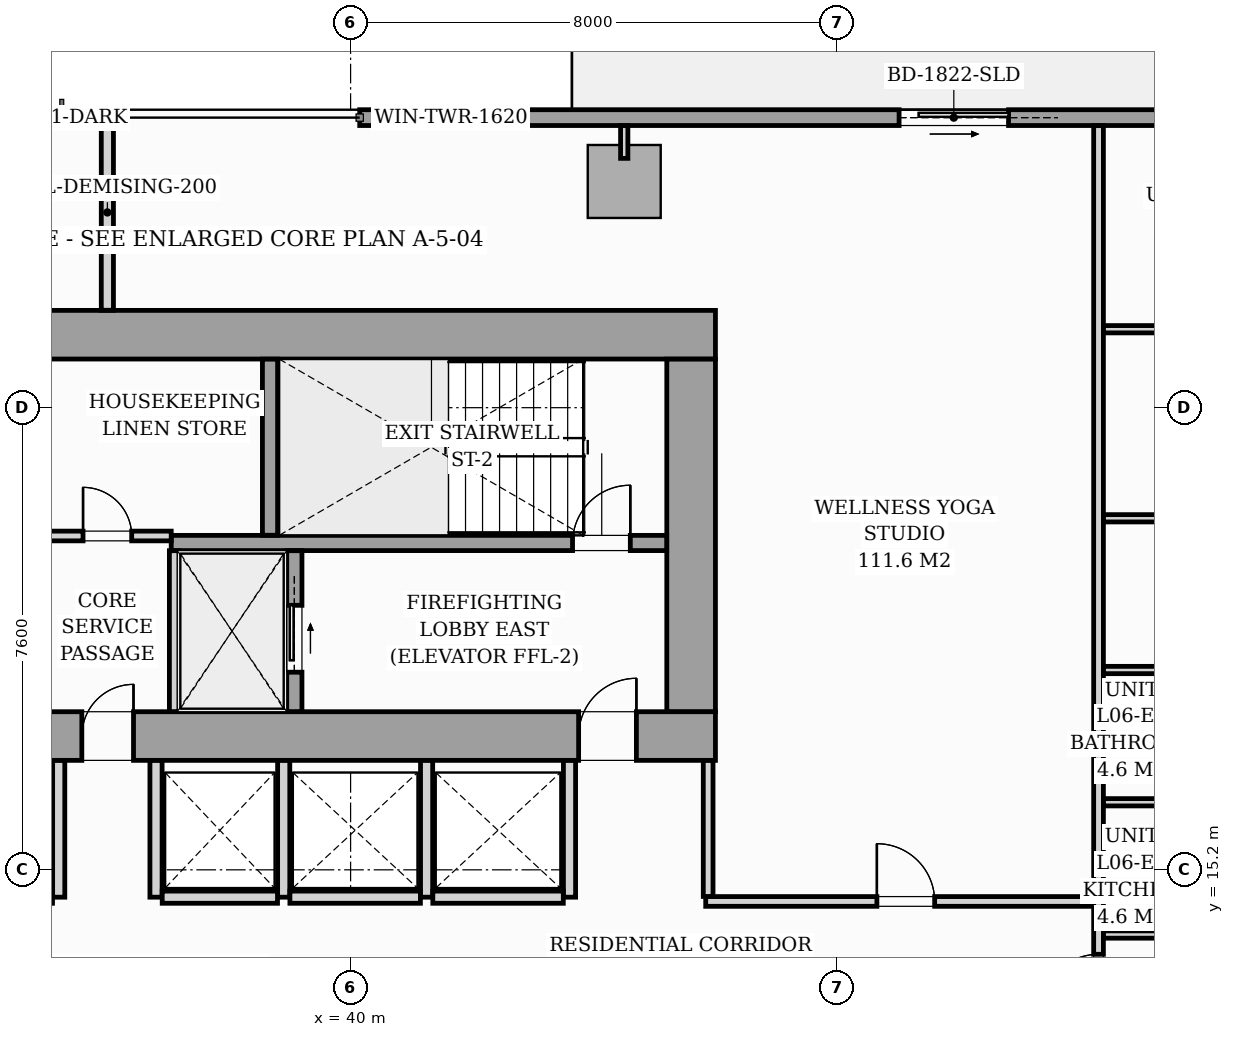
"""IFC4 building model, lengths in metres.
Left out: names, types, materials, properties, quantities, classifications, styles, units other than length and angle.
Written with IfcOpenShell. Run it as: python <this file> out.ifc"""

import sys

from ifc_helpers import new_model, si_unit, direction, frame, frame_2d, origin, origin_2d, place, context, subcontext, project, spatial, rectangle, i_section, extrude, source, transform, mapped, element, fill, save


model = new_model("IFC4")
c1 = context("Model", 3, precision=1e-05, world=origin(), true_north=direction((0.0, 1.0)))
c2 = subcontext(c1, "Body", "Model", "MODEL_VIEW")
j1 = project(units=[si_unit("LENGTHUNIT", "METRE"), si_unit("PLANEANGLEUNIT", "RADIAN")], contexts=[c1])
p1 = place(None, origin())
s1 = spatial("IfcSite", under=j1, at=p1, CompositionType="ELEMENT")
p2 = place(p1, origin())
s2 = spatial("IfcBuilding", under=s1, at=p2, CompositionType="ELEMENT")
p3 = place(p2, frame((0.0, 0.0, 26.2)))
s3 = spatial("IfcBuildingStorey", under=s2, at=p3, CompositionType="ELEMENT", Elevation=26.2)
m1 = source(origin(), c2, "Body", "SweptSolid", [
    extrude(i_section(OverallWidth=0.437, OverallDepth=0.514, WebThickness=0.061, FlangeThickness=0.097, FilletRadius=0.018, at=origin_2d()), origin(), (0.0, 0.0, 1.0), 3.196),
])
for number, where, z_axis, x_axis in (
    (1, (38.88, 17.4, 0.002), (0.0, 0.0, 1.0), (1.0, 0.0, 0.0)),
    (2, (45.6, 17.4, 0.002), (0.0, 0.0, 1.0), (1.0, 0.0, 0.0)),
    (3, (38.88, 24.0, 0.002), (0.0, 0.0, 1.0), (1.0, 0.0, 0.0)),
    (4, (45.6, 24.0, 0.002), (0.0, 0.0, 1.0), (1.0, 0.0, 0.0)),
):
    element("IfcColumn", number, at=place(p3, frame(where, z_axis=z_axis, x_axis=x_axis)), inside=s3, PredefinedType="PILASTER", context=c2, shape_type="MappedRepresentation", body=[
        mapped(m1, transform((0.0, 0.0, 0.0), scale=1.0)),
    ])
m2 = source(origin(), c2, "Body", "SweptSolid", [
    extrude(rectangle(XDim=1.2, YDim=1.2, at=origin_2d()), origin(), (0.0, 0.0, 1.0), 3.196),
])
p4 = place(p3, frame((44.5, 26.52, 0.002), z_axis=(0.0, 0.0, 1.0), x_axis=(1.0, 0.0, 0.0)))
e5 = element("IfcColumn", 5, at=p4, inside=s3, PredefinedType="COLUMN", context=c2, shape_type="MappedRepresentation", body=[
    mapped(m2, transform((0.0, 0.0, 0.0), scale=1.0)),
])
p5 = place(p3, frame((40.15, 27.57, 0.0), z_axis=(0.0, 0.0, 1.0), x_axis=(1.0, 0.0, 0.0)))
e6 = element("IfcWall", 6, at=p5, inside=s3, PredefinedType="STANDARD", context=c2, shape_type="SweptSolid", body=[
    extrude(rectangle(XDim=17.15, YDim=0.26, at=frame_2d((8.575, 0.0))), origin(), (0.0, 0.0, 1.0), 2.94),
])
p6 = place(p5, frame((8.87, 0.0, 0.0)))
e7 = element("IfcOpeningElement", 7, at=p6, cuts=e6, PredefinedType="OPENING", context=c2, shape_type="SweptSolid", body=[
    extrude(rectangle(XDim=1.8, YDim=2.06, at=frame_2d((0.9, 1.03))), frame((0.0, 0.14, 0.0), z_axis=(0.0, -1.0, 0.0), x_axis=(1.0, 0.0, 0.0)), (0.0, 0.0, 1.0), 0.28),
])
p7 = place(p5, frame((0.7, 0.0, 0.65)))
e8 = element("IfcOpeningElement", 8, at=p7, cuts=e6, PredefinedType="OPENING", context=c2, shape_type="SweptSolid", body=[
    extrude(rectangle(XDim=1.6, YDim=1.5, at=frame_2d((0.8, 0.75))), frame((0.0, 0.14, 0.0), z_axis=(0.0, -1.0, 0.0), x_axis=(1.0, 0.0, 0.0)), (0.0, 0.0, 1.0), 0.28),
])
p8 = place(p3, frame((26.0, 17.4, 0.0), z_axis=(0.0, 0.0, 1.0), x_axis=(1.0, 0.0, 0.0)))
e9 = element("IfcWall", 9, at=p8, inside=s3, PredefinedType="SHEAR", context=c2, shape_type="SweptSolid", body=[
    extrude(rectangle(XDim=20.0, YDim=0.8, at=frame_2d((10.0, 0.0))), origin(), (0.0, 0.0, 1.0), 3.2),
])
p9 = place(p8, frame((1.15, 0.0, 0.0)))
e10 = element("IfcOpeningElement", 10, at=p9, cuts=e9, PredefinedType="OPENING", context=c2, shape_type="SweptSolid", body=[
    extrude(rectangle(XDim=0.95, YDim=2.06, at=frame_2d((0.475, 1.03))), frame((0.0, 0.41, 0.0), z_axis=(0.0, -1.0, 0.0), x_axis=(1.0, 0.0, 0.0)), (0.0, 0.0, 1.0), 0.82),
])
p10 = place(p8, frame((9.58, 0.0, 0.0)))
e11 = element("IfcOpeningElement", 11, at=p10, cuts=e9, PredefinedType="OPENING", context=c2, shape_type="SweptSolid", body=[
    extrude(rectangle(XDim=0.85, YDim=2.0, at=frame_2d((0.425, 1.0))), frame((0.0, 0.41, 0.0), z_axis=(0.0, -1.0, 0.0), x_axis=(1.0, 0.0, 0.0)), (0.0, 0.0, 1.0), 0.82),
])
p11 = place(p8, frame((17.75, 0.0, 0.0)))
e12 = element("IfcOpeningElement", 12, at=p11, cuts=e9, PredefinedType="OPENING", context=c2, shape_type="SweptSolid", body=[
    extrude(rectangle(XDim=0.95, YDim=2.06, at=frame_2d((0.475, 1.03))), frame((0.0, 0.41, 0.0), z_axis=(0.0, -1.0, 0.0), x_axis=(1.0, 0.0, 0.0)), (0.0, 0.0, 1.0), 0.82),
])
p12 = place(p3, frame((26.0, 24.0, 0.0), z_axis=(0.0, 0.0, 1.0), x_axis=(1.0, 0.0, 0.0)))
e13 = element("IfcWall", 13, at=p12, inside=s3, PredefinedType="SHEAR", context=c2, shape_type="SweptSolid", body=[
    extrude(rectangle(XDim=20.0, YDim=0.8, at=frame_2d((10.0, 0.0))), origin(), (0.0, 0.0, 1.0), 3.2),
])
p13 = place(p3, frame((45.6, 17.802, 0.0), z_axis=(0.0, 0.0, 1.0), x_axis=(0.0, 1.0, 0.0)))
e14 = element("IfcWall", 14, at=p13, inside=s3, PredefinedType="SHEAR", context=c2, shape_type="SweptSolid", body=[
    extrude(rectangle(XDim=5.796, YDim=0.8, at=frame_2d((2.898, 0.0))), origin(), (0.0, 0.0, 1.0), 3.2),
])
p14 = place(p3, frame((37.05, 20.575, 0.0), z_axis=(0.0, 0.0, 1.0), x_axis=(1.0, 0.0, 0.0)))
e15 = element("IfcWall", 15, at=p14, inside=s3, PredefinedType="SOLIDWALL", context=c2, shape_type="SweptSolid", body=[
    extrude(rectangle(XDim=8.148, YDim=0.25, at=frame_2d((4.074, 0.0))), origin(), (0.0, 0.0, 1.0), 3.2),
])
p15 = place(p14, frame((6.6, 0.0, 0.0)))
e16 = element("IfcOpeningElement", 16, at=p15, cuts=e15, PredefinedType="OPENING", context=c2, shape_type="SweptSolid", body=[
    extrude(rectangle(XDim=0.95, YDim=2.06, at=frame_2d((0.475, 1.03))), frame((0.0, 0.135, 0.0), z_axis=(0.0, -1.0, 0.0), x_axis=(1.0, 0.0, 0.0)), (0.0, 0.0, 1.0), 0.27),
])
p16 = place(p3, frame((38.675, 20.702, 0.0), z_axis=(0.0, 0.0, 1.0), x_axis=(0.0, 1.0, 0.0)))
e17 = element("IfcWall", 17, at=p16, inside=s3, PredefinedType="SOLIDWALL", context=c2, shape_type="SweptSolid", body=[
    extrude(rectangle(XDim=2.896, YDim=0.25, at=frame_2d((1.448, 0.0))), origin(), (0.0, 0.0, 1.0), 3.2),
])
p17 = place(p3, frame((37.1, 17.802, 0.0), z_axis=(0.0, 0.0, 1.0), x_axis=(0.0, 1.0, 0.0)))
e18 = element("IfcWall", 18, at=p17, inside=s3, PredefinedType="PARTITIONING", context=c2, shape_type="SweptSolid", body=[
    extrude(rectangle(XDim=2.646, YDim=0.16, at=frame_2d((1.323, 0.0))), origin(), (0.0, 0.0, 1.0), 2.94),
])
p18 = place(p3, frame((39.075, 17.802, 0.0), z_axis=(0.0, 0.0, 1.0), x_axis=(0.0, 1.0, 0.0)))
e19 = element("IfcWall", 19, at=p18, inside=s3, PredefinedType="SOLIDWALL", context=c2, shape_type="SweptSolid", body=[
    extrude(rectangle(XDim=2.646, YDim=0.25, at=frame_2d((1.323, 0.0))), origin(), (0.0, 0.0, 1.0), 3.2),
])
p19 = place(p18, frame((0.648, 0.0, 0.0)))
e20 = element("IfcOpeningElement", 20, at=p19, cuts=e19, PredefinedType="OPENING", context=c2, shape_type="SweptSolid", body=[
    extrude(rectangle(XDim=1.1, YDim=2.08, at=frame_2d((0.55, 1.04))), frame((0.0, 0.135, 0.0), z_axis=(0.0, -1.0, 0.0), x_axis=(1.0, 0.0, 0.0)), (0.0, 0.0, 1.0), 0.27),
])
p20 = place(p3, frame((34.95, 20.69, 0.0), z_axis=(0.0, 0.0, 1.0), x_axis=(1.0, 0.0, 0.0)))
e21 = element("IfcWall", 21, at=p20, inside=s3, PredefinedType="PARTITIONING", context=c2, shape_type="SweptSolid", body=[
    extrude(rectangle(XDim=2.1, YDim=0.16, at=frame_2d((1.05, 0.0))), origin(), (0.0, 0.0, 1.0), 2.94),
])
p21 = place(p20, frame((0.65, 0.0, 0.0)))
e22 = element("IfcOpeningElement", 22, at=p21, cuts=e21, PredefinedType="OPENING", context=c2, shape_type="SweptSolid", body=[
    extrude(rectangle(XDim=0.8, YDim=2.05, at=frame_2d((0.4, 1.025))), frame((0.0, 0.09, 0.0), z_axis=(0.0, -1.0, 0.0), x_axis=(1.0, 0.0, 0.0)), (0.0, 0.0, 1.0), 0.18),
])
for number, where, z_axis, x_axis in (
    (23, (35.2, 14.75, 0.0), (0.0, 0.0, 1.0), (0.0, 1.0, 0.0)),
    (24, (36.8, 14.75, 0.0), (0.0, 0.0, 1.0), (0.0, 1.0, 0.0)),
    (25, (38.9, 14.75, 0.0), (0.0, 0.0, 1.0), (0.0, 1.0, 0.0)),
):
    element("IfcWall", number, at=place(p3, frame(where, z_axis=z_axis, x_axis=x_axis)), inside=s3, PredefinedType="PARTITIONING", context=c2, shape_type="SweptSolid", body=[
        extrude(rectangle(XDim=2.248, YDim=0.2, at=frame_2d((1.124, 0.0))), origin(), (0.0, 0.0, 1.0), 2.94),
    ])
p22 = place(p3, frame((36.902, 14.75, 0.0), z_axis=(0.0, 0.0, 1.0), x_axis=(1.0, 0.0, 0.0)))
e26 = element("IfcWall", 26, at=p22, inside=s3, PredefinedType="PARTITIONING", context=c2, shape_type="SweptSolid", body=[
    extrude(rectangle(XDim=1.896, YDim=0.2, at=frame_2d((0.948, 0.0))), origin(), (0.0, 0.0, 1.0), 2.94),
])
for number, where, z_axis, x_axis in (
    (27, (41.25, 14.75, 0.0), (0.0, 0.0, 1.0), (0.0, 1.0, 0.0)),
    (28, (43.6, 14.75, 0.0), (0.0, 0.0, 1.0), (0.0, 1.0, 0.0)),
):
    element("IfcWall", number, at=place(p3, frame(where, z_axis=z_axis, x_axis=x_axis)), inside=s3, PredefinedType="PARTITIONING", context=c2, shape_type="SweptSolid", body=[
        extrude(rectangle(XDim=2.248, YDim=0.2, at=frame_2d((1.124, 0.0))), origin(), (0.0, 0.0, 1.0), 2.94),
    ])
for number, where, z_axis, x_axis in (
    (29, (39.002, 14.75, 0.0), (0.0, 0.0, 1.0), (1.0, 0.0, 0.0)),
    (30, (41.352, 14.75, 0.0), (0.0, 0.0, 1.0), (1.0, 0.0, 0.0)),
):
    element("IfcWall", number, at=place(p3, frame(where, z_axis=z_axis, x_axis=x_axis)), inside=s3, PredefinedType="PARTITIONING", context=c2, shape_type="SweptSolid", body=[
        extrude(rectangle(XDim=2.146, YDim=0.2, at=frame_2d((1.073, 0.0))), origin(), (0.0, 0.0, 1.0), 2.94),
    ])
p23 = place(p3, frame((52.3, 12.432, 0.0), z_axis=(0.0, 0.0, 1.0), x_axis=(0.0, 1.0, 0.0)))
e31 = element("IfcWall", 31, at=p23, inside=s3, PredefinedType="PARTITIONING", context=c2, shape_type="SweptSolid", body=[
    extrude(rectangle(XDim=15.006, YDim=0.16, at=frame_2d((7.503, 0.0))), origin(), (0.0, 0.0, 1.0), 2.94),
])
p24 = place(p23, frame((0.429, 0.0, 0.0)))
e32 = element("IfcOpeningElement", 32, at=p24, cuts=e31, PredefinedType="OPENING", context=c2, shape_type="SweptSolid", body=[
    extrude(rectangle(XDim=0.95, YDim=2.06, at=frame_2d((0.475, 1.03))), frame((0.0, 0.09, 0.0), z_axis=(0.0, -1.0, 0.0), x_axis=(1.0, 0.0, 0.0)), (0.0, 0.0, 1.0), 0.18),
])
p25 = place(p3, frame((36.0, 24.402, 0.0), z_axis=(0.0, 0.0, 1.0), x_axis=(0.0, 1.0, 0.0)))
e33 = element("IfcWall", 33, at=p25, inside=s3, PredefinedType="PARTITIONING", context=c2, shape_type="SweptSolid", body=[
    extrude(rectangle(XDim=3.218, YDim=0.2, at=frame_2d((1.609, 0.0))), origin(), (0.0, 0.0, 1.0), 2.94),
])
p26 = place(p3, frame((52.382, 16.311, 0.0), z_axis=(0.0, 0.0, 1.0), x_axis=(1.0, 0.0, 0.0)))
e34 = element("IfcWall", 34, at=p26, inside=s3, PredefinedType="PARTITIONING", context=c2, shape_type="SweptSolid", body=[
    extrude(rectangle(XDim=2.256, YDim=0.12, at=frame_2d((1.128, 0.0))), origin(), (0.0, 0.0, 1.0), 2.045),
])
for number, where, z_axis, x_axis in (
    (35, (52.382, 14.136, 0.0), (0.0, 0.0, 1.0), (1.0, 0.0, 0.0)),
    (36, (52.382, 18.486, 0.0), (0.0, 0.0, 1.0), (1.0, 0.0, 0.0)),
):
    element("IfcWall", number, at=place(p3, frame(where, z_axis=z_axis, x_axis=x_axis)), inside=s3, PredefinedType="PARTITIONING", context=c2, shape_type="SweptSolid", body=[
        extrude(rectangle(XDim=2.256, YDim=0.12, at=frame_2d((1.128, 0.0))), origin(), (0.0, 0.0, 1.0), 2.94),
    ])
p27 = place(p3, frame((52.382, 24.09, 0.0), z_axis=(0.0, 0.0, 1.0), x_axis=(1.0, 0.0, 0.0)))
e37 = element("IfcWall", 37, at=p27, inside=s3, PredefinedType="PARTITIONING", context=c2, shape_type="SweptSolid", body=[
    extrude(rectangle(XDim=7.338, YDim=0.12, at=frame_2d((3.669, 0.0))), origin(), (0.0, 0.0, 1.0), 2.94),
])
p28 = place(p27, frame((3.253, 0.0, 0.0)))
e38 = element("IfcOpeningElement", 38, at=p28, cuts=e37, PredefinedType="OPENING", context=c2, shape_type="SweptSolid", body=[
    extrude(rectangle(XDim=0.85, YDim=2.05, at=frame_2d((0.425, 1.025))), frame((0.0, 0.07, 0.0), z_axis=(0.0, -1.0, 0.0), x_axis=(1.0, 0.0, 0.0)), (0.0, 0.0, 1.0), 0.14),
])
p29 = place(p3, frame((52.382, 20.981, 0.0), z_axis=(0.0, 0.0, 1.0), x_axis=(1.0, 0.0, 0.0)))
e39 = element("IfcWall", 39, at=p29, inside=s3, PredefinedType="PARTITIONING", context=c2, shape_type="SweptSolid", body=[
    extrude(rectangle(XDim=7.338, YDim=0.12, at=frame_2d((3.669, 0.0))), origin(), (0.0, 0.0, 1.0), 2.94),
])
p30 = place(p29, frame((3.253, 0.0, 0.0)))
e40 = element("IfcOpeningElement", 40, at=p30, cuts=e39, PredefinedType="OPENING", context=c2, shape_type="SweptSolid", body=[
    extrude(rectangle(XDim=0.85, YDim=2.05, at=frame_2d((0.425, 1.025))), frame((0.0, 0.07, 0.0), z_axis=(0.0, -1.0, 0.0), x_axis=(1.0, 0.0, 0.0)), (0.0, 0.0, 1.0), 0.14),
])
p31 = place(p3, frame((45.84, 14.68, 0.0), z_axis=(0.0, 0.0, 1.0), x_axis=(1.0, 0.0, 0.0)))
e41 = element("IfcWall", 41, at=p31, inside=s3, PredefinedType="PARTITIONING", context=c2, shape_type="SweptSolid", body=[
    extrude(rectangle(XDim=6.378, YDim=0.16, at=frame_2d((3.189, 0.0))), origin(), (0.0, 0.0, 1.0), 2.94),
])
p32 = place(p31, frame((2.815, 0.0, 0.0)))
e42 = element("IfcOpeningElement", 42, at=p32, cuts=e41, PredefinedType="OPENING", context=c2, shape_type="SweptSolid", body=[
    extrude(rectangle(XDim=0.95, YDim=2.06, at=frame_2d((0.475, 1.03))), frame((0.0, 0.09, 0.0), z_axis=(0.0, -1.0, 0.0), x_axis=(1.0, 0.0, 0.0)), (0.0, 0.0, 1.0), 0.18),
])
p33 = place(p3, frame((45.88, 14.762, 0.0), z_axis=(0.0, 0.0, 1.0), x_axis=(0.0, 1.0, 0.0)))
e43 = element("IfcWall", 43, at=p33, inside=s3, PredefinedType="PARTITIONING", context=c2, shape_type="SweptSolid", body=[
    extrude(rectangle(XDim=2.236, YDim=0.16, at=frame_2d((1.118, 0.0))), origin(), (0.0, 0.0, 1.0), 2.94),
])
p34 = place(p3, frame((44.5, 26.9, 0.0), z_axis=(0.0, 0.0, 1.0), x_axis=(0.0, 1.0, 0.0)))
e44 = element("IfcWall", 44, at=p34, inside=s3, PredefinedType="PARTITIONING", context=c2, shape_type="SweptSolid", body=[
    extrude(rectangle(XDim=0.538, YDim=0.12, at=frame_2d((0.269, 0.0))), origin(), (0.0, 0.0, 1.0), 2.94),
])
m3 = source(origin(), c2, "Body", "SweptSolid", [
    extrude(rectangle(XDim=1.8, YDim=2.06, at=frame_2d((0.9, 1.03))), frame((0.0, 0.025, 0.0), z_axis=(0.0, -1.0, 0.0), x_axis=(1.0, 0.0, 0.0)), (0.0, 0.0, 1.0), 0.05),
])
p35 = place(p6, origin())
e45 = element("IfcDoor", 45, at=p35, inside=s3, OperationType="SLIDING_TO_RIGHT", PredefinedType="DOOR", context=c2, shape_type="MappedRepresentation", body=[
    mapped(m3, transform((0.0, 0.0, 0.0), scale=1.0)),
])
fill(e7, e45)
m4 = source(origin(), c2, "Body", "SweptSolid", [
    extrude(rectangle(XDim=1.6, YDim=1.5, at=frame_2d((0.8, 0.75))), frame((0.0, 0.03, 0.0), z_axis=(0.0, -1.0, 0.0), x_axis=(1.0, 0.0, 0.0)), (0.0, 0.0, 1.0), 0.06),
])
p36 = place(p7, origin())
e46 = element("IfcWindow", 46, at=p36, inside=s3, PartitioningType="SINGLE_PANEL", PredefinedType="WINDOW", context=c2, shape_type="MappedRepresentation", body=[
    mapped(m4, transform((0.0, 0.0, 0.0), scale=1.0)),
])
fill(e8, e46)
m5 = source(origin(), c2, "Body", "SweptSolid", [
    extrude(rectangle(XDim=0.85, YDim=2.0, at=frame_2d((0.425, 1.0))), frame((0.0, 0.025, 0.0), z_axis=(0.0, -1.0, 0.0), x_axis=(1.0, 0.0, 0.0)), (0.0, 0.0, 1.0), 0.05),
])
p37 = place(p10, origin())
e47 = element("IfcDoor", 47, at=p37, inside=s3, OperationType="SINGLE_SWING_RIGHT", PredefinedType="DOOR", context=c2, shape_type="MappedRepresentation", body=[
    mapped(m5, transform((0.0, 0.0, 0.0), scale=1.0)),
])
fill(e11, e47)
m6 = source(origin(), c2, "Body", "SweptSolid", [
    extrude(rectangle(XDim=0.95, YDim=2.06, at=frame_2d((0.475, 1.03))), frame((0.0, 0.025, 0.0), z_axis=(0.0, -1.0, 0.0), x_axis=(1.0, 0.0, 0.0)), (0.0, 0.0, 1.0), 0.05),
])
p38 = place(p11, origin())
e48 = element("IfcDoor", 48, at=p38, inside=s3, OperationType="SINGLE_SWING_RIGHT", PredefinedType="DOOR", context=c2, shape_type="MappedRepresentation", body=[
    mapped(m6, transform((0.0, 0.0, 0.0), scale=1.0)),
])
fill(e12, e48)
p39 = place(p15, origin())
e49 = element("IfcDoor", 49, at=p39, inside=s3, OperationType="SINGLE_SWING_RIGHT", PredefinedType="DOOR", context=c2, shape_type="MappedRepresentation", body=[
    mapped(m6, transform((0.0, 0.0, 0.0), scale=1.0)),
])
fill(e16, e49)
m7 = source(origin(), c2, "Body", "SweptSolid", [
    extrude(rectangle(XDim=1.1, YDim=2.08, at=frame_2d((0.55, 1.04))), frame((0.0, 0.025, 0.0), z_axis=(0.0, -1.0, 0.0), x_axis=(1.0, 0.0, 0.0)), (0.0, 0.0, 1.0), 0.05),
])
p40 = place(p19, origin())
e50 = element("IfcDoor", 50, at=p40, inside=s3, OperationType="SLIDING_TO_RIGHT", PredefinedType="DOOR", context=c2, shape_type="MappedRepresentation", body=[
    mapped(m7, transform((0.0, 0.0, 0.0), scale=1.0)),
])
fill(e20, e50)
m8 = source(origin(), c2, "Body", "SweptSolid", [
    extrude(rectangle(XDim=0.8, YDim=2.05, at=frame_2d((0.4, 1.025))), frame((0.0, 0.025, 0.0), z_axis=(0.0, -1.0, 0.0), x_axis=(1.0, 0.0, 0.0)), (0.0, 0.0, 1.0), 0.05),
])
p41 = place(p21, origin())
e51 = element("IfcDoor", 51, at=p41, inside=s3, OperationType="SINGLE_SWING_LEFT", PredefinedType="DOOR", context=c2, shape_type="MappedRepresentation", body=[
    mapped(m8, transform((0.0, 0.0, 0.0), scale=1.0)),
])
fill(e22, e51)
m9 = source(origin(), c2, "Body", "SweptSolid", [
    extrude(rectangle(XDim=0.95, YDim=2.06, at=frame_2d((0.475, 1.03))), frame((0.0, 0.025, 0.0), z_axis=(0.0, -1.0, 0.0), x_axis=(1.0, 0.0, 0.0)), (0.0, 0.0, 1.0), 0.05),
])
p42 = place(p24, origin())
e52 = element("IfcDoor", 52, at=p42, inside=s3, OperationType="SINGLE_SWING_LEFT", PredefinedType="DOOR", context=c2, shape_type="MappedRepresentation", body=[
    mapped(m9, transform((0.0, 0.0, 0.0), scale=1.0)),
])
fill(e32, e52)
p43 = place(p32, origin())
e53 = element("IfcDoor", 53, at=p43, inside=s3, OperationType="SINGLE_SWING_LEFT", PredefinedType="DOOR", context=c2, shape_type="MappedRepresentation", body=[
    mapped(m9, transform((0.0, 0.0, 0.0), scale=1.0)),
])
fill(e42, e53)
save(model, sys.argv[1])
